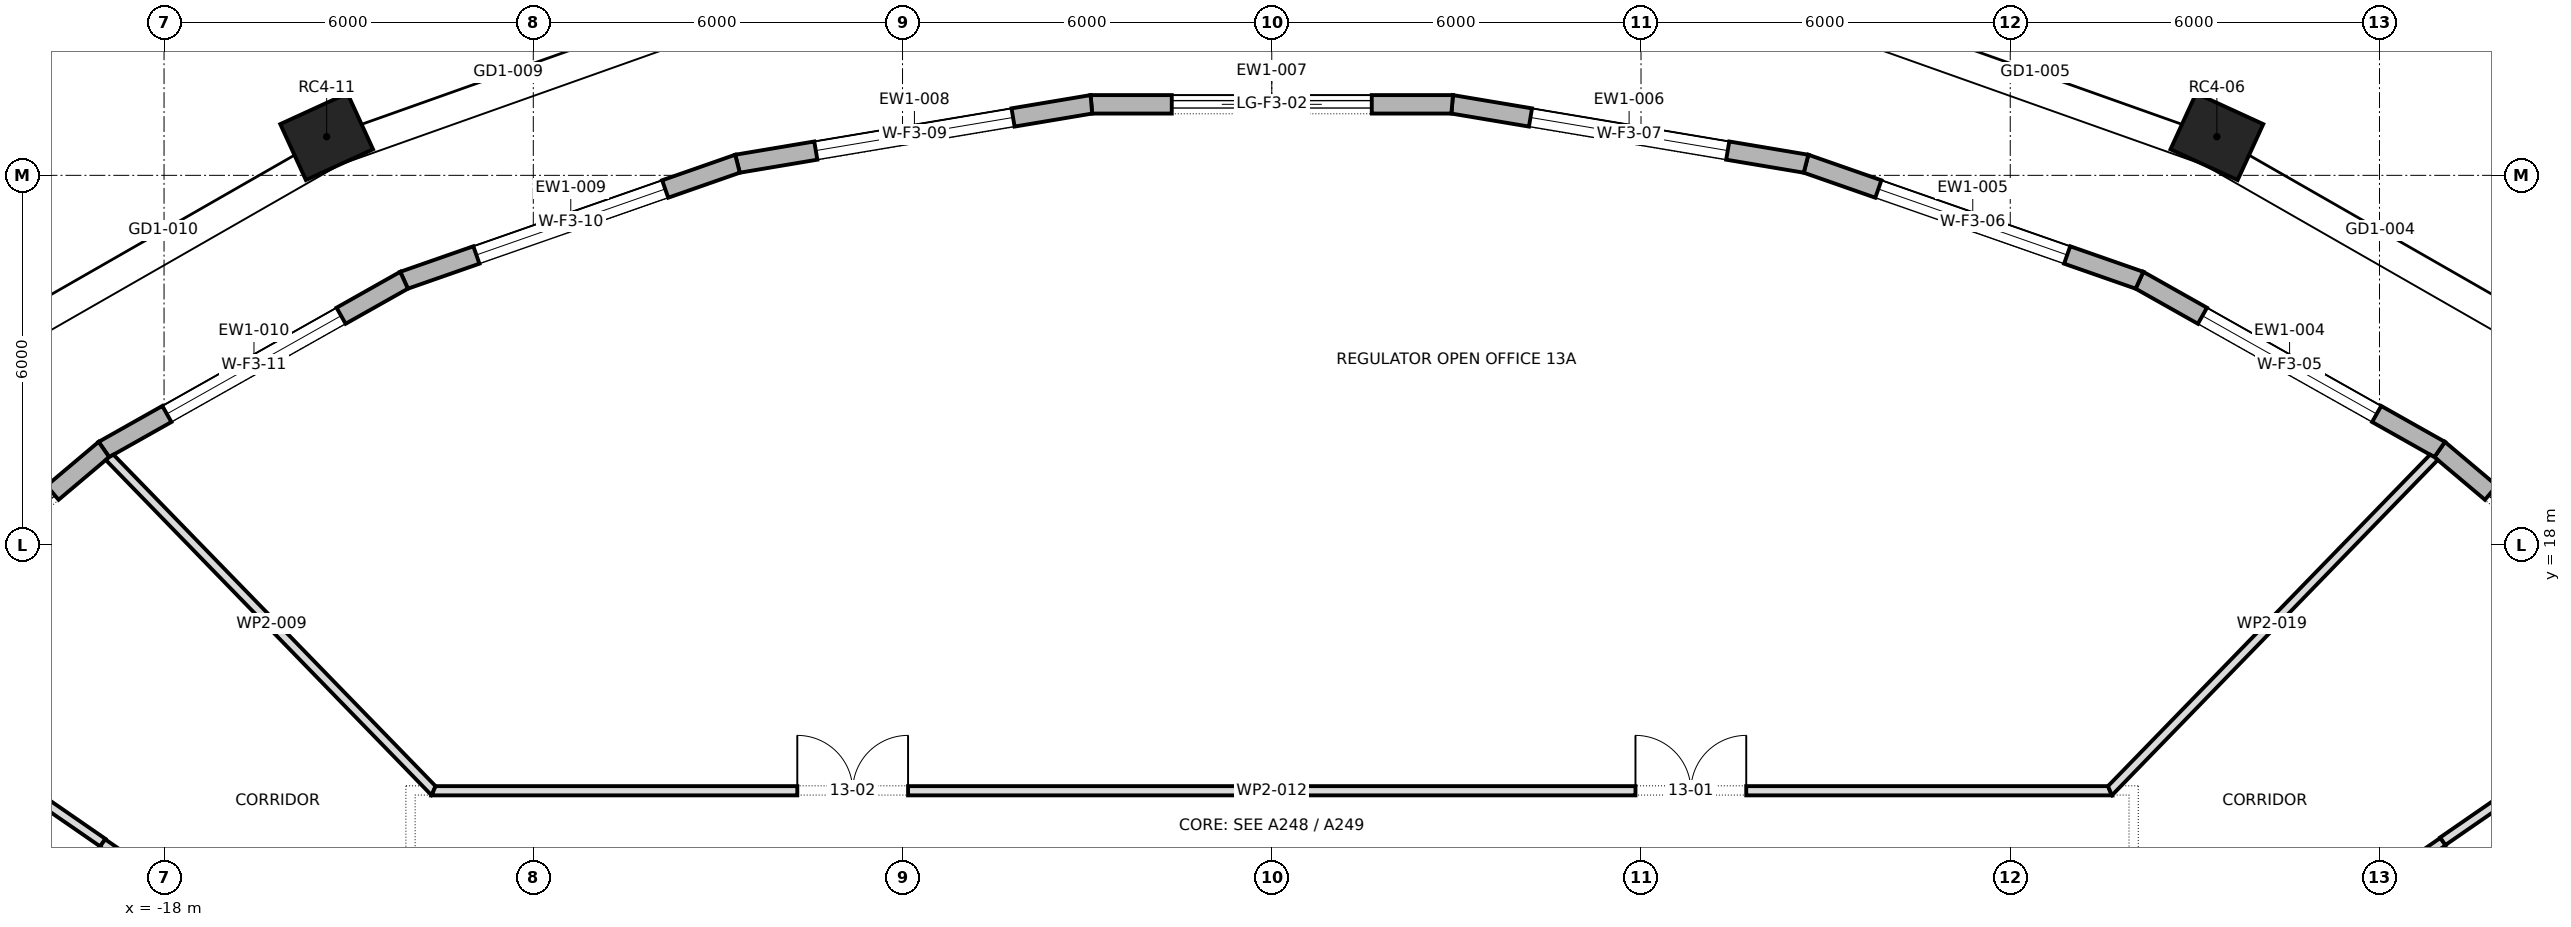
"""IFC4 building model, lengths in metres.
Left out: names, types, materials, properties, quantities, classifications, styles, units other than length and angle.
Written with IfcOpenShell. Run it as: python <this file> out.ifc"""

import sys

from ifc_helpers import new_model, si_unit, direction, frame, frame_2d, origin, origin_2d, place, context, subcontext, project, spatial, polyline, rectangle, outline, extrude, element, fill, save


model = new_model("IFC4")
c1 = context("Model", 3, precision=1e-05, world=origin(), true_north=direction((0.0, 1.0)))
c2 = subcontext(c1, "Body", "Model", "MODEL_VIEW")
j1 = project(units=[si_unit("LENGTHUNIT", "METRE"), si_unit("PLANEANGLEUNIT", "RADIAN")], contexts=[c1])
p1 = place(None, origin())
s1 = spatial("IfcSite", under=j1, at=p1, CompositionType="ELEMENT")
p2 = place(p1, origin())
s2 = spatial("IfcBuilding", under=s1, at=p2, CompositionType="ELEMENT")
p3 = place(p2, frame((0.0, 0.0, 190.9)))
s3 = spatial("IfcBuildingStorey", under=s2, at=p3, CompositionType="ELEMENT", Elevation=190.9)
for number, where, z_axis, x_axis in (
    (1, (15.358, 24.627, 0.0), (0.0, 0.0, 1.0), (-0.909, 0.417, 0.0)),
    (2, (-15.358, 24.627, 0.0), (0.0, 0.0, 1.0), (-0.909, -0.417, 0.0)),
):
    element("IfcColumn", number, at=place(p3, frame(where, z_axis=z_axis, x_axis=x_axis)), inside=s3, PredefinedType="COLUMN", context=c2, shape_type="SweptSolid", body=[
        extrude(rectangle(XDim=1.2, YDim=1.0, at=origin_2d()), origin(), (0.0, 0.0, 1.0), 4.0),
    ])
p4 = place(p3, frame((23.128, 16.044, 0.0), z_axis=(0.0, 0.0, 1.0), x_axis=(-0.764330261608, 0.644824977176, 0.0)))
e3 = element("IfcWall", 3, at=p4, inside=s3, PredefinedType="STANDARD", context=c2, shape_type="SweptSolid", body=[
    extrude(outline(polyline([(-0.015, -0.15), (5.444, -0.15), (5.416, 0.15), (0.015, 0.15), (-0.015, -0.15)])), origin(), (0.0, 0.0, 1.0), 3.7),
])
p5 = place(p4, frame((1.09, 0.0, 0.0)))
e4 = element("IfcOpeningElement", 4, at=p5, cuts=e3, PredefinedType="OPENING", context=c2, shape_type="SweptSolid", body=[
    extrude(rectangle(XDim=3.25, YDim=3.25, at=frame_2d((1.625, 1.625))), frame((0.0, 0.162, 0.0), z_axis=(0.0, -1.0, 0.0), x_axis=(1.0, 0.0, 0.0)), (0.0, 0.0, 1.0), 0.324),
])
p6 = place(p3, frame((18.977, 19.545, 0.0), z_axis=(0.0, 0.0, 1.0), x_axis=(-0.871083701819, 0.491134588912, 0.0)))
e5 = element("IfcWall", 5, at=p6, inside=s3, PredefinedType="STANDARD", context=c2, shape_type="SweptSolid", body=[
    extrude(outline(polyline([(-0.014, -0.15), (5.613, -0.15), (5.586, 0.15), (0.014, 0.15), (-0.014, -0.15)])), origin(), (0.0, 0.0, 1.0), 3.7),
])
p7 = place(p6, frame((1.175, 0.0, 0.6)))
e6 = element("IfcOpeningElement", 6, at=p7, cuts=e5, PredefinedType="OPENING", context=c2, shape_type="SweptSolid", body=[
    extrude(rectangle(XDim=3.25, YDim=2.65, at=frame_2d((1.625, 1.325))), frame((0.0, 0.162, 0.0), z_axis=(0.0, -1.0, 0.0), x_axis=(1.0, 0.0, 0.0)), (0.0, 0.0, 1.0), 0.324),
])
p8 = place(p3, frame((14.1, 22.295, 0.0), z_axis=(0.0, 0.0, 1.0), x_axis=(-0.944020060936, 0.329888048511, 0.0)))
e7 = element("IfcWall", 7, at=p8, inside=s3, PredefinedType="STANDARD", context=c2, shape_type="SweptSolid", body=[
    extrude(outline(polyline([(-0.013, -0.15), (5.752, -0.15), (5.727, 0.15), (0.013, 0.15), (-0.013, -0.15)])), origin(), (0.0, 0.0, 1.0), 3.7),
])
p9 = place(p8, frame((1.245, 0.0, 0.6)))
e8 = element("IfcOpeningElement", 8, at=p9, cuts=e7, PredefinedType="OPENING", context=c2, shape_type="SweptSolid", body=[
    extrude(rectangle(XDim=3.25, YDim=2.65, at=frame_2d((1.625, 1.325))), frame((0.0, 0.162, 0.0), z_axis=(0.0, -1.0, 0.0), x_axis=(1.0, 0.0, 0.0)), (0.0, 0.0, 1.0), 0.324),
])
p10 = place(p3, frame((8.682, 24.189, 0.0), z_axis=(0.0, 0.0, 1.0), x_axis=(-0.986207709048, 0.165512400181, 0.0)))
e9 = element("IfcWall", 9, at=p10, inside=s3, PredefinedType="STANDARD", context=c2, shape_type="SweptSolid", body=[
    extrude(outline(polyline([(-0.013, -0.15), (5.843, -0.15), (5.818, 0.15), (0.013, 0.15), (-0.013, -0.15)])), origin(), (0.0, 0.0, 1.0), 3.7),
])
p11 = place(p10, frame((1.291, 0.0, 0.6)))
e10 = element("IfcOpeningElement", 10, at=p11, cuts=e9, PredefinedType="OPENING", context=c2, shape_type="SweptSolid", body=[
    extrude(rectangle(XDim=3.25, YDim=2.65, at=frame_2d((1.625, 1.325))), frame((0.0, 0.162, 0.0), z_axis=(0.0, -1.0, 0.0), x_axis=(1.0, 0.0, 0.0)), (0.0, 0.0, 1.0), 0.324),
])
p12 = place(p3, frame((2.931, 25.154, 0.0), z_axis=(0.0, 0.0, 1.0), x_axis=(-1.0, 0.0, 0.0)))
e11 = element("IfcWall", 11, at=p12, inside=s3, PredefinedType="STANDARD", context=c2, shape_type="SweptSolid", body=[
    extrude(outline(polyline([(-0.012, -0.15), (5.875, -0.15), (5.85, 0.15), (0.012, 0.15), (-0.012, -0.15)])), origin(), (0.0, 0.0, 1.0), 3.7),
])
p13 = place(p12, frame((1.306, 0.0, 0.0)))
e12 = element("IfcOpeningElement", 12, at=p13, cuts=e11, PredefinedType="OPENING", context=c2, shape_type="SweptSolid", body=[
    extrude(rectangle(XDim=3.25, YDim=3.25, at=frame_2d((1.625, 1.625))), frame((0.0, 0.162, 0.0), z_axis=(0.0, -1.0, 0.0), x_axis=(1.0, 0.0, 0.0)), (0.0, 0.0, 1.0), 0.324),
])
p14 = place(p3, frame((-2.931, 25.154, 0.0), z_axis=(0.0, 0.0, 1.0), x_axis=(-0.986207709048, -0.165512400181, 0.0)))
e13 = element("IfcWall", 13, at=p14, inside=s3, PredefinedType="STANDARD", context=c2, shape_type="SweptSolid", body=[
    extrude(outline(polyline([(-0.012, -0.15), (5.844, -0.15), (5.818, 0.15), (0.012, 0.15), (-0.012, -0.15)])), origin(), (0.0, 0.0, 1.0), 3.7),
])
p15 = place(p14, frame((1.291, 0.0, 0.6)))
e14 = element("IfcOpeningElement", 14, at=p15, cuts=e13, PredefinedType="OPENING", context=c2, shape_type="SweptSolid", body=[
    extrude(rectangle(XDim=3.25, YDim=2.65, at=frame_2d((1.625, 1.325))), frame((0.0, 0.162, 0.0), z_axis=(0.0, -1.0, 0.0), x_axis=(1.0, 0.0, 0.0)), (0.0, 0.0, 1.0), 0.324),
])
p16 = place(p3, frame((-8.682, 24.189, 0.0), z_axis=(0.0, 0.0, 1.0), x_axis=(-0.944020060936, -0.329888048511, 0.0)))
e15 = element("IfcWall", 15, at=p16, inside=s3, PredefinedType="STANDARD", context=c2, shape_type="SweptSolid", body=[
    extrude(outline(polyline([(-0.013, -0.15), (5.753, -0.15), (5.726, 0.15), (0.013, 0.15), (-0.013, -0.15)])), origin(), (0.0, 0.0, 1.0), 3.7),
])
p17 = place(p16, frame((1.245, 0.0, 0.6)))
e16 = element("IfcOpeningElement", 16, at=p17, cuts=e15, PredefinedType="OPENING", context=c2, shape_type="SweptSolid", body=[
    extrude(rectangle(XDim=3.25, YDim=2.65, at=frame_2d((1.625, 1.325))), frame((0.0, 0.162, 0.0), z_axis=(0.0, -1.0, 0.0), x_axis=(1.0, 0.0, 0.0)), (0.0, 0.0, 1.0), 0.324),
])
p18 = place(p3, frame((-14.1, 22.295, 0.0), z_axis=(0.0, 0.0, 1.0), x_axis=(-0.871083701819, -0.491134588912, 0.0)))
e17 = element("IfcWall", 17, at=p18, inside=s3, PredefinedType="STANDARD", context=c2, shape_type="SweptSolid", body=[
    extrude(outline(polyline([(-0.013, -0.15), (5.614, -0.15), (5.585, 0.15), (0.013, 0.15), (-0.013, -0.15)])), origin(), (0.0, 0.0, 1.0), 3.7),
])
p19 = place(p18, frame((1.175, 0.0, 0.6)))
e18 = element("IfcOpeningElement", 18, at=p19, cuts=e17, PredefinedType="OPENING", context=c2, shape_type="SweptSolid", body=[
    extrude(rectangle(XDim=3.25, YDim=2.65, at=frame_2d((1.625, 1.325))), frame((0.0, 0.162, 0.0), z_axis=(0.0, -1.0, 0.0), x_axis=(1.0, 0.0, 0.0)), (0.0, 0.0, 1.0), 0.324),
])
p20 = place(p3, frame((-18.977, 19.545, 0.0), z_axis=(0.0, 0.0, 1.0), x_axis=(-0.764330261608, -0.644824977176, 0.0)))
e19 = element("IfcWall", 19, at=p20, inside=s3, PredefinedType="STANDARD", context=c2, shape_type="SweptSolid", body=[
    extrude(outline(polyline([(-0.014, -0.15), (5.445, -0.15), (5.415, 0.15), (0.014, 0.15), (-0.014, -0.15)])), origin(), (0.0, 0.0, 1.0), 3.7),
])
p21 = place(p20, frame((1.09, 0.0, 0.0)))
e20 = element("IfcOpeningElement", 20, at=p21, cuts=e19, PredefinedType="OPENING", context=c2, shape_type="SweptSolid", body=[
    extrude(rectangle(XDim=3.25, YDim=3.25, at=frame_2d((1.625, 1.625))), frame((0.0, 0.162, 0.0), z_axis=(0.0, -1.0, 0.0), x_axis=(1.0, 0.0, 0.0)), (0.0, 0.0, 1.0), 0.324),
])
p22 = place(p3, frame((-23.024, 15.94, 0.0), z_axis=(0.0, 0.0, 1.0), x_axis=(0.822739240619, -0.568418984505, 0.0)))
e21 = element("IfcWall", 21, at=p22, inside=s3, PredefinedType="PARTITIONING", context=c2, shape_type="SweptSolid", body=[
    extrude(outline(polyline([(4.897, 0.075), (3.273, 0.075), (1.649, 0.075), (0.025, 0.075), (0.005, 0.002), (0.0, -0.069), (0.0, -0.075), (1.632, -0.075), (3.264, -0.075), (4.897, -0.075), (4.897, 0.075)])), origin(), (0.0, 0.0, 1.0), 3.7),
])
p23 = place(p3, frame((-19.0, 4.926, 0.0), z_axis=(0.0, 0.0, 1.0), x_axis=(0.0, 1.0, 0.0)))
e22 = element("IfcWall", 22, at=p23, inside=s3, PredefinedType="PARTITIONING", context=c2, shape_type="SweptSolid", body=[
    extrude(outline(polyline([(0.0, -0.05), (1.62, -0.05), (3.239, -0.05), (4.859, -0.05), (6.479, -0.05), (8.098, -0.05), (8.162, 0.043), (8.169, 0.038), (8.177, 0.05), (8.177, 0.05), (6.547, 0.05), (4.917, 0.05), (3.286, 0.05), (1.656, 0.05), (0.025, 0.05), (0.0, -0.049), (0.0, -0.05)])), origin(), (0.0, 0.0, 1.0), 3.7),
])
p24 = place(p23, frame((3.629, 0.0, 0.0)))
e23 = element("IfcOpeningElement", 23, at=p24, cuts=e22, PredefinedType="OPENING", context=c2, shape_type="SweptSolid", body=[
    extrude(rectangle(XDim=0.9, YDim=2.1, at=frame_2d((0.45, 1.05))), frame((0.0, 0.062, 0.0), z_axis=(0.0, -1.0, 0.0), x_axis=(1.0, 0.0, 0.0)), (0.0, 0.0, 1.0), 0.124),
])
p25 = place(p3, frame((-19.0, 13.15, 0.0), z_axis=(0.0, 0.0, 1.0), x_axis=(0.822301327334, -0.569052306088, 0.0)))
e24 = element("IfcWall", 24, at=p25, inside=s3, PredefinedType="PARTITIONING", context=c2, shape_type="SweptSolid", body=[
    extrude(outline(polyline([(0.0, -0.075), (1.51, -0.075), (3.021, -0.075), (4.531, -0.075), (6.041, -0.075), (6.12, 0.075), (4.59, 0.075), (3.06, 0.075), (1.53, 0.075), (0.0, 0.075), (0.0, -0.075)])), origin(), (0.0, 0.0, 1.0), 2.947),
])
p26 = place(p3, frame((-18.893, 19.427, 0.0), z_axis=(0.0, 0.0, 1.0), x_axis=(0.696864554069, -0.717202756048, 0.0)))
e25 = element("IfcWall", 25, at=p26, inside=s3, PredefinedType="PARTITIONING", context=c2, shape_type="SweptSolid", body=[
    extrude(outline(polyline([(0.0, -0.075), (1.9, -0.075), (3.799, -0.075), (5.699, -0.075), (7.599, -0.075), (7.567, 0.0), (7.535, 0.075), (5.658, 0.075), (3.78, 0.075), (1.903, 0.075), (0.025, 0.075), (0.005, -0.003), (0.0, -0.073), (0.0, -0.075)])), origin(), (0.0, 0.0, 1.0), 3.7),
])
p27 = place(p3, frame((-13.652, 14.0, 0.0), z_axis=(0.0, 0.0, 1.0), x_axis=(1.0, 0.0, 0.0)))
e26 = element("IfcWall", 26, at=p27, inside=s3, PredefinedType="PARTITIONING", context=c2, shape_type="SweptSolid", body=[
    extrude(outline(polyline([(27.303, -0.075), (27.303, -0.075), (27.24, 0.075), (25.299, 0.075), (23.358, 0.075), (21.416, 0.075), (19.475, 0.075), (17.534, 0.075), (15.593, 0.075), (13.652, 0.075), (11.71, 0.075), (9.769, 0.075), (7.828, 0.075), (5.887, 0.075), (3.946, 0.075), (2.004, 0.075), (0.063, 0.075), (0.0, -0.075), (0.0, -0.075), (1.95, -0.075), (3.9, -0.075), (5.851, -0.075), (7.801, -0.075), (9.751, -0.075), (11.701, -0.075), (13.652, -0.075), (15.602, -0.075), (17.552, -0.075), (19.502, -0.075), (21.453, -0.075), (23.403, -0.075), (25.353, -0.075), (27.303, -0.075)])), origin(), (0.0, 0.0, 1.0), 3.7),
])
p28 = place(p27, frame((19.562, 0.0, 0.0)))
e27 = element("IfcOpeningElement", 27, at=p28, cuts=e26, PredefinedType="OPENING", context=c2, shape_type="SweptSolid", body=[
    extrude(rectangle(XDim=1.8, YDim=2.1, at=frame_2d((0.9, 1.05))), frame((0.0, 0.087, 0.0), z_axis=(0.0, -1.0, 0.0), x_axis=(1.0, 0.0, 0.0)), (0.0, 0.0, 1.0), 0.174),
])
p29 = place(p27, frame((5.942, 0.0, 0.0)))
e28 = element("IfcOpeningElement", 28, at=p29, cuts=e26, PredefinedType="OPENING", context=c2, shape_type="SweptSolid", body=[
    extrude(rectangle(XDim=1.8, YDim=2.1, at=frame_2d((0.9, 1.05))), frame((0.0, 0.087, 0.0), z_axis=(0.0, -1.0, 0.0), x_axis=(1.0, 0.0, 0.0)), (0.0, 0.0, 1.0), 0.174),
])
p30 = place(p3, frame((13.598, 13.977, 0.0), z_axis=(0.0, 0.0, 1.0), x_axis=(0.696864554069, 0.717202756048, 0.0)))
e29 = element("IfcWall", 29, at=p30, inside=s3, PredefinedType="PARTITIONING", context=c2, shape_type="SweptSolid", body=[
    extrude(outline(polyline([(7.599, -0.075), (7.599, -0.074), (7.594, -0.003), (7.573, 0.075), (5.696, 0.075), (3.818, 0.075), (1.941, 0.075), (0.063, 0.075), (0.032, 0.0), (0.0, -0.075), (1.9, -0.075), (3.799, -0.075), (5.699, -0.075), (7.599, -0.075)])), origin(), (0.0, 0.0, 1.0), 3.7),
])
p31 = place(p3, frame((13.968, 9.667, 0.0), z_axis=(0.0, 0.0, 1.0), x_axis=(0.822290630684, 0.569067762827, 0.0)))
e30 = element("IfcWall", 30, at=p31, inside=s3, PredefinedType="PARTITIONING", context=c2, shape_type="SweptSolid", body=[
    extrude(outline(polyline([(6.16, 0.075), (4.62, 0.075), (3.08, 0.075), (1.54, 0.075), (0.0, 0.075), (0.079, -0.075), (1.599, -0.075), (3.119, -0.075), (4.64, -0.075), (6.16, -0.075), (6.16, 0.075)])), origin(), (0.0, 0.0, 1.0), 2.947),
])
p32 = place(p3, frame((19.028, 13.179, 0.0), z_axis=(0.0, 0.0, 1.0), x_axis=(0.822732902653, 0.568428158074, 0.0)))
e31 = element("IfcWall", 31, at=p32, inside=s3, PredefinedType="PARTITIONING", context=c2, shape_type="SweptSolid", body=[
    extrude(outline(polyline([(4.857, -0.075), (4.857, -0.068), (4.852, 0.002), (4.832, 0.075), (3.221, 0.075), (1.611, 0.075), (0.0, 0.075), (0.0, -0.04), (0.0, -0.075), (1.619, -0.075), (3.238, -0.075), (4.857, -0.075)])), origin(), (0.0, 0.0, 1.0), 3.7),
])
p33 = place(p3, frame((19.0, 13.093, 0.0), z_axis=(0.0, 0.0, 1.0), x_axis=(0.0, -1.0, 0.0)))
e32 = element("IfcWall", 32, at=p33, inside=s3, PredefinedType="PARTITIONING", context=c2, shape_type="SweptSolid", body=[
    extrude(outline(polyline([(8.167, -0.05), (8.167, -0.049), (8.142, 0.05), (6.513, 0.05), (4.885, 0.05), (3.257, 0.05), (1.628, 0.05), (0.0, 0.05), (0.0, 0.05), (0.069, -0.05), (1.688, -0.05), (3.308, -0.05), (4.928, -0.05), (6.547, -0.05), (8.167, -0.05)])), origin(), (0.0, 0.0, 1.0), 3.7),
])
p34 = place(p33, frame((3.638, 0.0, 0.0)))
e33 = element("IfcOpeningElement", 33, at=p34, cuts=e32, PredefinedType="OPENING", context=c2, shape_type="SweptSolid", body=[
    extrude(rectangle(XDim=0.9, YDim=2.1, at=frame_2d((0.45, 1.05))), frame((0.0, 0.062, 0.0), z_axis=(0.0, -1.0, 0.0), x_axis=(1.0, 0.0, 0.0)), (0.0, 0.0, 1.0), 0.124),
])
p35 = place(p5, origin())
e34 = element("IfcDoor", 34, at=p35, inside=s3, OperationType="DOUBLE_DOOR_SLIDING", PredefinedType="DOOR", context=c2, shape_type="SweptSolid", body=[
    extrude(rectangle(XDim=3.25, YDim=3.25, at=frame_2d((1.625, 1.625))), frame((0.0, 0.025, 0.0), z_axis=(0.0, -1.0, 0.0), x_axis=(1.0, 0.0, 0.0)), (0.0, 0.0, 1.0), 0.05),
])
fill(e4, e34)
p36 = place(p7, origin())
e35 = element("IfcWindow", 35, at=p36, inside=s3, PartitioningType="TRIPLE_PANEL_VERTICAL", PredefinedType="WINDOW", context=c2, shape_type="SweptSolid", body=[
    extrude(rectangle(XDim=3.25, YDim=2.65, at=frame_2d((1.625, 1.325))), frame((0.0, 0.03, 0.0), z_axis=(0.0, -1.0, 0.0), x_axis=(1.0, 0.0, 0.0)), (0.0, 0.0, 1.0), 0.06),
])
fill(e6, e35)
p37 = place(p9, origin())
e36 = element("IfcWindow", 36, at=p37, inside=s3, PartitioningType="TRIPLE_PANEL_VERTICAL", PredefinedType="WINDOW", context=c2, shape_type="SweptSolid", body=[
    extrude(rectangle(XDim=3.25, YDim=2.65, at=frame_2d((1.625, 1.325))), frame((0.0, 0.03, 0.0), z_axis=(0.0, -1.0, 0.0), x_axis=(1.0, 0.0, 0.0)), (0.0, 0.0, 1.0), 0.06),
])
fill(e8, e36)
p38 = place(p11, origin())
e37 = element("IfcWindow", 37, at=p38, inside=s3, PartitioningType="TRIPLE_PANEL_VERTICAL", PredefinedType="WINDOW", context=c2, shape_type="SweptSolid", body=[
    extrude(rectangle(XDim=3.25, YDim=2.65, at=frame_2d((1.625, 1.325))), frame((0.0, 0.03, 0.0), z_axis=(0.0, -1.0, 0.0), x_axis=(1.0, 0.0, 0.0)), (0.0, 0.0, 1.0), 0.06),
])
fill(e10, e37)
p39 = place(p13, origin())
e38 = element("IfcDoor", 38, at=p39, inside=s3, OperationType="DOUBLE_DOOR_SLIDING", PredefinedType="DOOR", context=c2, shape_type="SweptSolid", body=[
    extrude(rectangle(XDim=3.25, YDim=3.25, at=frame_2d((1.625, 1.625))), frame((0.0, 0.025, 0.0), z_axis=(0.0, -1.0, 0.0), x_axis=(1.0, 0.0, 0.0)), (0.0, 0.0, 1.0), 0.05),
])
fill(e12, e38)
p40 = place(p15, origin())
e39 = element("IfcWindow", 39, at=p40, inside=s3, PartitioningType="TRIPLE_PANEL_VERTICAL", PredefinedType="WINDOW", context=c2, shape_type="SweptSolid", body=[
    extrude(rectangle(XDim=3.25, YDim=2.65, at=frame_2d((1.625, 1.325))), frame((0.0, 0.03, 0.0), z_axis=(0.0, -1.0, 0.0), x_axis=(1.0, 0.0, 0.0)), (0.0, 0.0, 1.0), 0.06),
])
fill(e14, e39)
p41 = place(p17, origin())
e40 = element("IfcWindow", 40, at=p41, inside=s3, PartitioningType="TRIPLE_PANEL_VERTICAL", PredefinedType="WINDOW", context=c2, shape_type="SweptSolid", body=[
    extrude(rectangle(XDim=3.25, YDim=2.65, at=frame_2d((1.625, 1.325))), frame((0.0, 0.03, 0.0), z_axis=(0.0, -1.0, 0.0), x_axis=(1.0, 0.0, 0.0)), (0.0, 0.0, 1.0), 0.06),
])
fill(e16, e40)
p42 = place(p19, origin())
e41 = element("IfcWindow", 41, at=p42, inside=s3, PartitioningType="TRIPLE_PANEL_VERTICAL", PredefinedType="WINDOW", context=c2, shape_type="SweptSolid", body=[
    extrude(rectangle(XDim=3.25, YDim=2.65, at=frame_2d((1.625, 1.325))), frame((0.0, 0.03, 0.0), z_axis=(0.0, -1.0, 0.0), x_axis=(1.0, 0.0, 0.0)), (0.0, 0.0, 1.0), 0.06),
])
fill(e18, e41)
p43 = place(p21, origin())
e42 = element("IfcDoor", 42, at=p43, inside=s3, OperationType="DOUBLE_DOOR_SLIDING", PredefinedType="DOOR", context=c2, shape_type="SweptSolid", body=[
    extrude(rectangle(XDim=3.25, YDim=3.25, at=frame_2d((1.625, 1.625))), frame((0.0, 0.025, 0.0), z_axis=(0.0, -1.0, 0.0), x_axis=(1.0, 0.0, 0.0)), (0.0, 0.0, 1.0), 0.05),
])
fill(e20, e42)
p44 = place(p28, origin())
e43 = element("IfcDoor", 43, at=p44, inside=s3, OperationType="DOUBLE_DOOR_SINGLE_SWING", PredefinedType="DOOR", context=c2, shape_type="SweptSolid", body=[
    extrude(rectangle(XDim=1.8, YDim=2.1, at=frame_2d((0.9, 1.05))), frame((0.0, 0.025, 0.0), z_axis=(0.0, -1.0, 0.0), x_axis=(1.0, 0.0, 0.0)), (0.0, 0.0, 1.0), 0.05),
])
fill(e27, e43)
p45 = place(p29, origin())
e44 = element("IfcDoor", 44, at=p45, inside=s3, OperationType="DOUBLE_DOOR_SINGLE_SWING", PredefinedType="DOOR", context=c2, shape_type="SweptSolid", body=[
    extrude(rectangle(XDim=1.8, YDim=2.1, at=frame_2d((0.9, 1.05))), frame((0.0, 0.025, 0.0), z_axis=(0.0, -1.0, 0.0), x_axis=(1.0, 0.0, 0.0)), (0.0, 0.0, 1.0), 0.05),
])
fill(e28, e44)
save(model, sys.argv[1])
